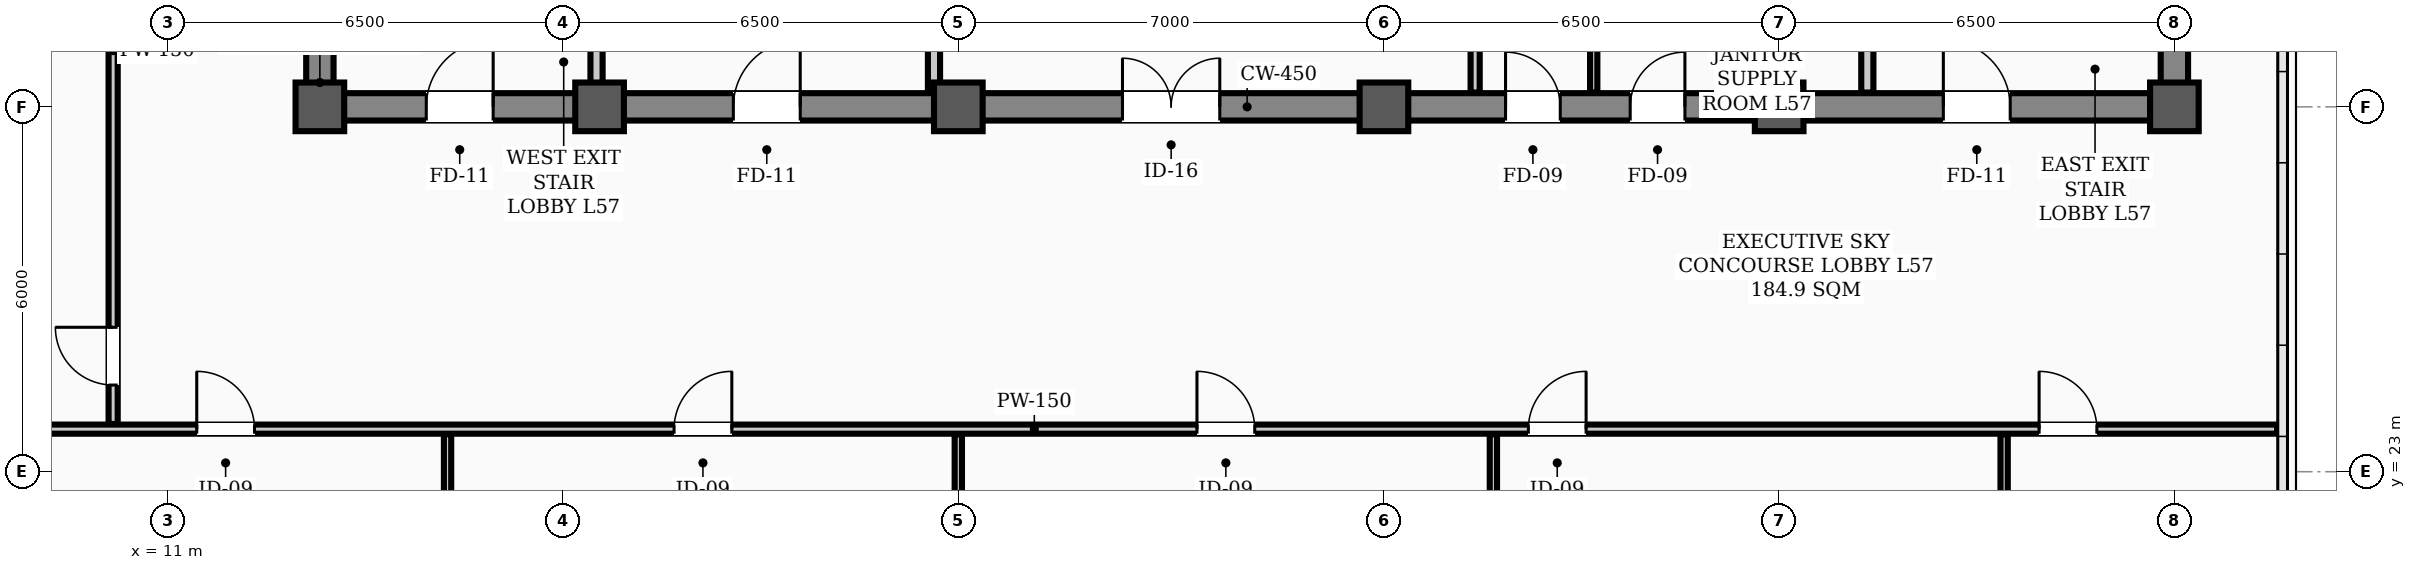
"""IFC4 building model, lengths in metres.
Left out: names, types, materials, properties, quantities, classifications, styles, units other than length and angle.
Written with IfcOpenShell. Run it as: python <this file> out.ifc"""

import sys

from ifc_helpers import new_model, si_unit, direction, frame, frame_2d, origin, origin_2d, place, context, subcontext, project, spatial, rectangle, hollow_rectangle, extrude, element, fill, save


model = new_model("IFC4")
c1 = context("Model", 3, precision=1e-05, world=origin(), true_north=direction((0.0, 1.0)))
c2 = subcontext(c1, "Body", "Model", "MODEL_VIEW")
j1 = project(units=[si_unit("LENGTHUNIT", "METRE"), si_unit("PLANEANGLEUNIT", "RADIAN")], contexts=[c1])
p1 = place(None, origin())
s1 = spatial("IfcSite", under=j1, at=p1, CompositionType="ELEMENT")
p2 = place(p1, origin())
s2 = spatial("IfcBuilding", under=s1, at=p2, CompositionType="ELEMENT")
p3 = place(p2, frame((0.0, 0.0, 230.6)))
s3 = spatial("IfcBuildingStorey", under=s2, at=p3, CompositionType="ELEMENT", Elevation=230.6)
for number, where, z_axis, x_axis in (
    (1, (13.5, 29.0, 0.0), (0.0, 0.0, 1.0), (1.0, 0.0, 0.0)),
    (2, (18.1, 29.0, 0.0), (0.0, 0.0, 1.0), (1.0, 0.0, 0.0)),
    (3, (24.0, 29.0, 0.0), (0.0, 0.0, 1.0), (1.0, 0.0, 0.0)),
    (4, (31.0, 29.0, 0.0), (0.0, 0.0, 1.0), (1.0, 0.0, 0.0)),
    (5, (37.5, 29.0, 0.0), (0.0, 0.0, 1.0), (1.0, 0.0, 0.0)),
    (6, (44.0, 29.0, 0.0), (0.0, 0.0, 1.0), (1.0, 0.0, 0.0)),
):
    element("IfcColumn", number, at=place(p3, frame(where, z_axis=z_axis, x_axis=x_axis)), inside=s3, PredefinedType="COLUMN", context=c2, shape_type="SweptSolid", body=[
        extrude(hollow_rectangle(XDim=0.8, YDim=0.8, WallThickness=0.032, InnerFilletRadius=0.016, OuterFilletRadius=0.048, at=origin_2d()), origin(), (0.0, 0.0, 1.0), 3.9),
    ])
p4 = place(p3, frame((13.5, 29.0, 0.0), z_axis=(0.0, 0.0, 1.0), x_axis=(1.0, 0.0, 0.0)))
e7 = element("IfcWall", 7, at=p4, inside=s3, PredefinedType="SHEAR", context=c2, shape_type="SweptSolid", body=[
    extrude(rectangle(XDim=30.5, YDim=0.45, at=frame_2d((15.25, 0.0))), origin(), (0.0, 0.0, 1.0), 3.72),
])
p5 = place(p4, frame((1.75, 0.0, 0.0)))
e8 = element("IfcOpeningElement", 8, at=p5, cuts=e7, PredefinedType="OPENING", context=c2, shape_type="SweptSolid", body=[
    extrude(rectangle(XDim=1.1, YDim=2.08, at=frame_2d((0.55, 1.04))), frame((0.0, 0.235, 0.0), z_axis=(0.0, -1.0, 0.0), x_axis=(1.0, 0.0, 0.0)), (0.0, 0.0, 1.0), 0.47),
])
p6 = place(p4, frame((26.7, 0.0, 0.0)))
e9 = element("IfcOpeningElement", 9, at=p6, cuts=e7, PredefinedType="OPENING", context=c2, shape_type="SweptSolid", body=[
    extrude(rectangle(XDim=1.1, YDim=2.08, at=frame_2d((0.55, 1.04))), frame((0.0, 0.235, 0.0), z_axis=(0.0, -1.0, 0.0), x_axis=(1.0, 0.0, 0.0)), (0.0, 0.0, 1.0), 0.47),
])
p7 = place(p4, frame((6.8, 0.0, 0.0)))
e10 = element("IfcOpeningElement", 10, at=p7, cuts=e7, PredefinedType="OPENING", context=c2, shape_type="SweptSolid", body=[
    extrude(rectangle(XDim=1.1, YDim=2.08, at=frame_2d((0.55, 1.04))), frame((0.0, 0.235, 0.0), z_axis=(0.0, -1.0, 0.0), x_axis=(1.0, 0.0, 0.0)), (0.0, 0.0, 1.0), 0.47),
])
p8 = place(p4, frame((13.2, 0.0, 0.0)))
e11 = element("IfcOpeningElement", 11, at=p8, cuts=e7, PredefinedType="OPENING", context=c2, shape_type="SweptSolid", body=[
    extrude(rectangle(XDim=1.6, YDim=2.08, at=frame_2d((0.8, 1.04))), frame((0.0, 0.235, 0.0), z_axis=(0.0, -1.0, 0.0), x_axis=(1.0, 0.0, 0.0)), (0.0, 0.0, 1.0), 0.47),
])
p9 = place(p4, frame((19.5, 0.0, 0.0)))
e12 = element("IfcOpeningElement", 12, at=p9, cuts=e7, PredefinedType="OPENING", context=c2, shape_type="SweptSolid", body=[
    extrude(rectangle(XDim=0.9, YDim=2.08, at=frame_2d((0.45, 1.04))), frame((0.0, 0.235, 0.0), z_axis=(0.0, -1.0, 0.0), x_axis=(1.0, 0.0, 0.0)), (0.0, 0.0, 1.0), 0.47),
])
p10 = place(p4, frame((21.55, 0.0, 0.0)))
e13 = element("IfcOpeningElement", 13, at=p10, cuts=e7, PredefinedType="OPENING", context=c2, shape_type="SweptSolid", body=[
    extrude(rectangle(XDim=0.9, YDim=2.08, at=frame_2d((0.45, 1.04))), frame((0.0, 0.235, 0.0), z_axis=(0.0, -1.0, 0.0), x_axis=(1.0, 0.0, 0.0)), (0.0, 0.0, 1.0), 0.47),
])
for number, where, z_axis, x_axis in (
    (14, (13.5, 29.35, 0.0), (0.0, 0.0, 1.0), (0.0, 1.0, 0.0)),
    (15, (44.0, 29.35, 0.0), (0.0, 0.0, 1.0), (0.0, 1.0, 0.0)),
):
    element("IfcWall", number, at=place(p3, frame(where, z_axis=z_axis, x_axis=x_axis)), inside=s3, PredefinedType="SHEAR", context=c2, shape_type="SweptSolid", body=[
        extrude(rectangle(XDim=8.6, YDim=0.45, at=frame_2d((4.3, 0.0))), origin(), (0.0, 0.0, 1.0), 3.72),
    ])
p11 = place(p3, frame((4.81, 23.7, 0.0), z_axis=(0.0, 0.0, 1.0), x_axis=(1.0, 0.0, 0.0)))
e16 = element("IfcWall", 16, at=p11, inside=s3, PredefinedType="PARTITIONING", context=c2, shape_type="SweptSolid", body=[
    extrude(rectangle(XDim=40.88, YDim=0.15, at=frame_2d((20.44, 0.0))), origin(), (0.0, 0.0, 1.0), 3.2),
])
p12 = place(p11, frame((6.665, 0.0, 0.0)))
e17 = element("IfcOpeningElement", 17, at=p12, cuts=e16, PredefinedType="OPENING", context=c2, shape_type="SweptSolid", body=[
    extrude(rectangle(XDim=0.95, YDim=2.08, at=frame_2d((0.475, 1.04))), frame((0.0, 0.085, 0.0), z_axis=(0.0, -1.0, 0.0), x_axis=(1.0, 0.0, 0.0)), (0.0, 0.0, 1.0), 0.17),
])
p13 = place(p11, frame((14.515, 0.0, 0.0)))
e18 = element("IfcOpeningElement", 18, at=p13, cuts=e16, PredefinedType="OPENING", context=c2, shape_type="SweptSolid", body=[
    extrude(rectangle(XDim=0.95, YDim=2.08, at=frame_2d((0.475, 1.04))), frame((0.0, 0.085, 0.0), z_axis=(0.0, -1.0, 0.0), x_axis=(1.0, 0.0, 0.0)), (0.0, 0.0, 1.0), 0.17),
])
p14 = place(p11, frame((23.115, 0.0, 0.0)))
e19 = element("IfcOpeningElement", 19, at=p14, cuts=e16, PredefinedType="OPENING", context=c2, shape_type="SweptSolid", body=[
    extrude(rectangle(XDim=0.95, YDim=2.08, at=frame_2d((0.475, 1.04))), frame((0.0, 0.085, 0.0), z_axis=(0.0, -1.0, 0.0), x_axis=(1.0, 0.0, 0.0)), (0.0, 0.0, 1.0), 0.17),
])
p15 = place(p11, frame((28.565, 0.0, 0.0)))
e20 = element("IfcOpeningElement", 20, at=p15, cuts=e16, PredefinedType="OPENING", context=c2, shape_type="SweptSolid", body=[
    extrude(rectangle(XDim=0.95, YDim=2.08, at=frame_2d((0.475, 1.04))), frame((0.0, 0.085, 0.0), z_axis=(0.0, -1.0, 0.0), x_axis=(1.0, 0.0, 0.0)), (0.0, 0.0, 1.0), 0.17),
])
p16 = place(p11, frame((36.965, 0.0, 0.0)))
e21 = element("IfcOpeningElement", 21, at=p16, cuts=e16, PredefinedType="OPENING", context=c2, shape_type="SweptSolid", body=[
    extrude(rectangle(XDim=0.95, YDim=2.08, at=frame_2d((0.475, 1.04))), frame((0.0, 0.085, 0.0), z_axis=(0.0, -1.0, 0.0), x_axis=(1.0, 0.0, 0.0)), (0.0, 0.0, 1.0), 0.17),
])
p17 = place(p3, frame((18.05, 29.235, 0.0), z_axis=(0.0, 0.0, 1.0), x_axis=(0.0, 1.0, 0.0)))
e22 = element("IfcWall", 22, at=p17, inside=s3, PredefinedType="STANDARD", context=c2, shape_type="SweptSolid", body=[
    extrude(rectangle(XDim=1.065, YDim=0.2, at=frame_2d((0.532, 0.0))), origin(), (0.0, 0.0, 1.0), 3.35),
])
p18 = place(p3, frame((38.95, 29.235, 0.0), z_axis=(0.0, 0.0, 1.0), x_axis=(0.0, 1.0, 0.0)))
e23 = element("IfcWall", 23, at=p18, inside=s3, PredefinedType="STANDARD", context=c2, shape_type="SweptSolid", body=[
    extrude(rectangle(XDim=1.065, YDim=0.2, at=frame_2d((0.532, 0.0))), origin(), (0.0, 0.0, 1.0), 3.72),
])
p19 = place(p3, frame((23.6, 29.235, 0.0), z_axis=(0.0, 0.0, 1.0), x_axis=(0.0, 1.0, 0.0)))
e24 = element("IfcWall", 24, at=p19, inside=s3, PredefinedType="STANDARD", context=c2, shape_type="SweptSolid", body=[
    extrude(rectangle(XDim=5.465, YDim=0.2, at=frame_2d((2.732, 0.0))), origin(), (0.0, 0.0, 1.0), 3.2),
])
p20 = place(p3, frame((32.5, 29.235, 0.0), z_axis=(0.0, 0.0, 1.0), x_axis=(0.0, 1.0, 0.0)))
e25 = element("IfcWall", 25, at=p20, inside=s3, PredefinedType="PARTITIONING", context=c2, shape_type="SweptSolid", body=[
    extrude(rectangle(XDim=2.53, YDim=0.15, at=frame_2d((1.265, 0.0))), origin(), (0.0, 0.0, 1.0), 3.35),
])
for number, where, z_axis, x_axis in (
    (26, (36.6, 29.235, 0.0), (0.0, 0.0, 1.0), (0.0, 1.0, 0.0)),
    (27, (34.45, 29.235, 0.0), (0.0, 0.0, 1.0), (0.0, 1.0, 0.0)),
):
    element("IfcWall", number, at=place(p3, frame(where, z_axis=z_axis, x_axis=x_axis)), inside=s3, PredefinedType="PARTITIONING", context=c2, shape_type="SweptSolid", body=[
        extrude(rectangle(XDim=2.53, YDim=0.12, at=frame_2d((1.265, 0.0))), origin(), (0.0, 0.0, 1.0), 3.35),
    ])
p21 = place(p3, frame((10.1, 23.785, 0.0), z_axis=(0.0, 0.0, 1.0), x_axis=(0.0, 1.0, 0.0)))
e28 = element("IfcWall", 28, at=p21, inside=s3, PredefinedType="PARTITIONING", context=c2, shape_type="SweptSolid", body=[
    extrude(rectangle(XDim=12.28, YDim=0.15, at=frame_2d((6.14, 0.0))), origin(), (0.0, 0.0, 1.0), 3.1),
])
p22 = place(p21, frame((0.64, 0.0, 0.0)))
e29 = element("IfcOpeningElement", 29, at=p22, cuts=e28, PredefinedType="OPENING", context=c2, shape_type="SweptSolid", body=[
    extrude(rectangle(XDim=0.95, YDim=2.08, at=frame_2d((0.475, 1.04))), frame((0.0, 0.085, 0.0), z_axis=(0.0, -1.0, 0.0), x_axis=(1.0, 0.0, 0.0)), (0.0, 0.0, 1.0), 0.17),
])
p23 = place(p21, frame((9.815, 0.0, 0.0)))
e30 = element("IfcOpeningElement", 30, at=p23, cuts=e28, PredefinedType="OPENING", context=c2, shape_type="SweptSolid", body=[
    extrude(rectangle(XDim=0.95, YDim=2.08, at=frame_2d((0.475, 1.04))), frame((0.0, 0.085, 0.0), z_axis=(0.0, -1.0, 0.0), x_axis=(1.0, 0.0, 0.0)), (0.0, 0.0, 1.0), 0.17),
])
p24 = place(p3, frame((15.6, 12.41, 0.0), z_axis=(0.0, 0.0, 1.0), x_axis=(0.0, 1.0, 0.0)))
e31 = element("IfcWall", 31, at=p24, inside=s3, PredefinedType="PARTITIONING", context=c2, shape_type="SweptSolid", body=[
    extrude(rectangle(XDim=11.205, YDim=0.12, at=frame_2d((5.603, 0.0))), origin(), (0.0, 0.0, 1.0), 3.1),
])
p25 = place(p3, frame((24.0, 14.17, 0.0), z_axis=(0.0, 0.0, 1.0), x_axis=(0.0, 1.0, 0.0)))
e32 = element("IfcWall", 32, at=p25, inside=s3, PredefinedType="PARTITIONING", context=c2, shape_type="SweptSolid", body=[
    extrude(rectangle(XDim=9.445, YDim=0.12, at=frame_2d((4.723, 0.0))), origin(), (0.0, 0.0, 1.0), 3.1),
])
p26 = place(p3, frame((32.8, 12.41, 0.0), z_axis=(0.0, 0.0, 1.0), x_axis=(0.0, 1.0, 0.0)))
e33 = element("IfcWall", 33, at=p26, inside=s3, PredefinedType="PARTITIONING", context=c2, shape_type="SweptSolid", body=[
    extrude(rectangle(XDim=11.205, YDim=0.12, at=frame_2d((5.603, 0.0))), origin(), (0.0, 0.0, 1.0), 3.1),
])
p27 = place(p3, frame((41.2, 12.41, 0.0), z_axis=(0.0, 0.0, 1.0), x_axis=(0.0, 1.0, 0.0)))
e34 = element("IfcWall", 34, at=p27, inside=s3, PredefinedType="PARTITIONING", context=c2, shape_type="SweptSolid", body=[
    extrude(rectangle(XDim=11.205, YDim=0.12, at=frame_2d((5.603, 0.0))), origin(), (0.0, 0.0, 1.0), 3.72),
])
p28 = place(p5, origin())
e35 = element("IfcDoor", 35, at=p28, inside=s3, OperationType="SINGLE_SWING_RIGHT", PredefinedType="DOOR", context=c2, shape_type="SweptSolid", body=[
    extrude(rectangle(XDim=1.1, YDim=2.08, at=frame_2d((0.55, 1.04))), frame((0.0, 0.025, 0.0), z_axis=(0.0, -1.0, 0.0), x_axis=(1.0, 0.0, 0.0)), (0.0, 0.0, 1.0), 0.05),
])
fill(e8, e35)
p29 = place(p6, origin())
e36 = element("IfcDoor", 36, at=p29, inside=s3, OperationType="SINGLE_SWING_LEFT", PredefinedType="DOOR", context=c2, shape_type="SweptSolid", body=[
    extrude(rectangle(XDim=1.1, YDim=2.08, at=frame_2d((0.55, 1.04))), frame((0.0, 0.025, 0.0), z_axis=(0.0, -1.0, 0.0), x_axis=(1.0, 0.0, 0.0)), (0.0, 0.0, 1.0), 0.05),
])
fill(e9, e36)
p30 = place(p7, origin())
e37 = element("IfcDoor", 37, at=p30, inside=s3, OperationType="SINGLE_SWING_RIGHT", PredefinedType="DOOR", context=c2, shape_type="SweptSolid", body=[
    extrude(rectangle(XDim=1.1, YDim=2.08, at=frame_2d((0.55, 1.04))), frame((0.0, 0.025, 0.0), z_axis=(0.0, -1.0, 0.0), x_axis=(1.0, 0.0, 0.0)), (0.0, 0.0, 1.0), 0.05),
])
fill(e10, e37)
p31 = place(p8, origin())
e38 = element("IfcDoor", 38, at=p31, inside=s3, OperationType="DOUBLE_DOOR_SINGLE_SWING", PredefinedType="DOOR", context=c2, shape_type="SweptSolid", body=[
    extrude(rectangle(XDim=1.6, YDim=2.08, at=frame_2d((0.8, 1.04))), frame((0.0, 0.025, 0.0), z_axis=(0.0, -1.0, 0.0), x_axis=(1.0, 0.0, 0.0)), (0.0, 0.0, 1.0), 0.05),
])
fill(e11, e38)
p32 = place(p9, origin())
e39 = element("IfcDoor", 39, at=p32, inside=s3, OperationType="SINGLE_SWING_LEFT", PredefinedType="DOOR", context=c2, shape_type="SweptSolid", body=[
    extrude(rectangle(XDim=0.9, YDim=2.08, at=frame_2d((0.45, 1.04))), frame((0.0, 0.025, 0.0), z_axis=(0.0, -1.0, 0.0), x_axis=(1.0, 0.0, 0.0)), (0.0, 0.0, 1.0), 0.05),
])
fill(e12, e39)
p33 = place(p10, origin())
e40 = element("IfcDoor", 40, at=p33, inside=s3, OperationType="SINGLE_SWING_RIGHT", PredefinedType="DOOR", context=c2, shape_type="SweptSolid", body=[
    extrude(rectangle(XDim=0.9, YDim=2.08, at=frame_2d((0.45, 1.04))), frame((0.0, 0.025, 0.0), z_axis=(0.0, -1.0, 0.0), x_axis=(1.0, 0.0, 0.0)), (0.0, 0.0, 1.0), 0.05),
])
fill(e13, e40)
p34 = place(p12, origin())
e41 = element("IfcDoor", 41, at=p34, inside=s3, OperationType="SINGLE_SWING_LEFT", PredefinedType="DOOR", context=c2, shape_type="SweptSolid", body=[
    extrude(rectangle(XDim=0.95, YDim=2.08, at=frame_2d((0.475, 1.04))), frame((0.0, 0.025, 0.0), z_axis=(0.0, -1.0, 0.0), x_axis=(1.0, 0.0, 0.0)), (0.0, 0.0, 1.0), 0.05),
])
fill(e17, e41)
p35 = place(p13, origin())
e42 = element("IfcDoor", 42, at=p35, inside=s3, OperationType="SINGLE_SWING_RIGHT", PredefinedType="DOOR", context=c2, shape_type="SweptSolid", body=[
    extrude(rectangle(XDim=0.95, YDim=2.08, at=frame_2d((0.475, 1.04))), frame((0.0, 0.025, 0.0), z_axis=(0.0, -1.0, 0.0), x_axis=(1.0, 0.0, 0.0)), (0.0, 0.0, 1.0), 0.05),
])
fill(e18, e42)
p36 = place(p14, origin())
e43 = element("IfcDoor", 43, at=p36, inside=s3, OperationType="SINGLE_SWING_LEFT", PredefinedType="DOOR", context=c2, shape_type="SweptSolid", body=[
    extrude(rectangle(XDim=0.95, YDim=2.08, at=frame_2d((0.475, 1.04))), frame((0.0, 0.025, 0.0), z_axis=(0.0, -1.0, 0.0), x_axis=(1.0, 0.0, 0.0)), (0.0, 0.0, 1.0), 0.05),
])
fill(e19, e43)
p37 = place(p15, origin())
e44 = element("IfcDoor", 44, at=p37, inside=s3, OperationType="SINGLE_SWING_RIGHT", PredefinedType="DOOR", context=c2, shape_type="SweptSolid", body=[
    extrude(rectangle(XDim=0.95, YDim=2.08, at=frame_2d((0.475, 1.04))), frame((0.0, 0.025, 0.0), z_axis=(0.0, -1.0, 0.0), x_axis=(1.0, 0.0, 0.0)), (0.0, 0.0, 1.0), 0.05),
])
fill(e20, e44)
p38 = place(p16, origin())
e45 = element("IfcDoor", 45, at=p38, inside=s3, OperationType="SINGLE_SWING_LEFT", PredefinedType="DOOR", context=c2, shape_type="SweptSolid", body=[
    extrude(rectangle(XDim=0.95, YDim=2.08, at=frame_2d((0.475, 1.04))), frame((0.0, 0.025, 0.0), z_axis=(0.0, -1.0, 0.0), x_axis=(1.0, 0.0, 0.0)), (0.0, 0.0, 1.0), 0.05),
])
fill(e21, e45)
p39 = place(p22, origin())
e46 = element("IfcDoor", 46, at=p39, inside=s3, OperationType="SINGLE_SWING_RIGHT", PredefinedType="DOOR", context=c2, shape_type="SweptSolid", body=[
    extrude(rectangle(XDim=0.95, YDim=2.08, at=frame_2d((0.475, 1.04))), frame((0.0, 0.025, 0.0), z_axis=(0.0, -1.0, 0.0), x_axis=(1.0, 0.0, 0.0)), (0.0, 0.0, 1.0), 0.05),
])
fill(e29, e46)
save(model, sys.argv[1])
